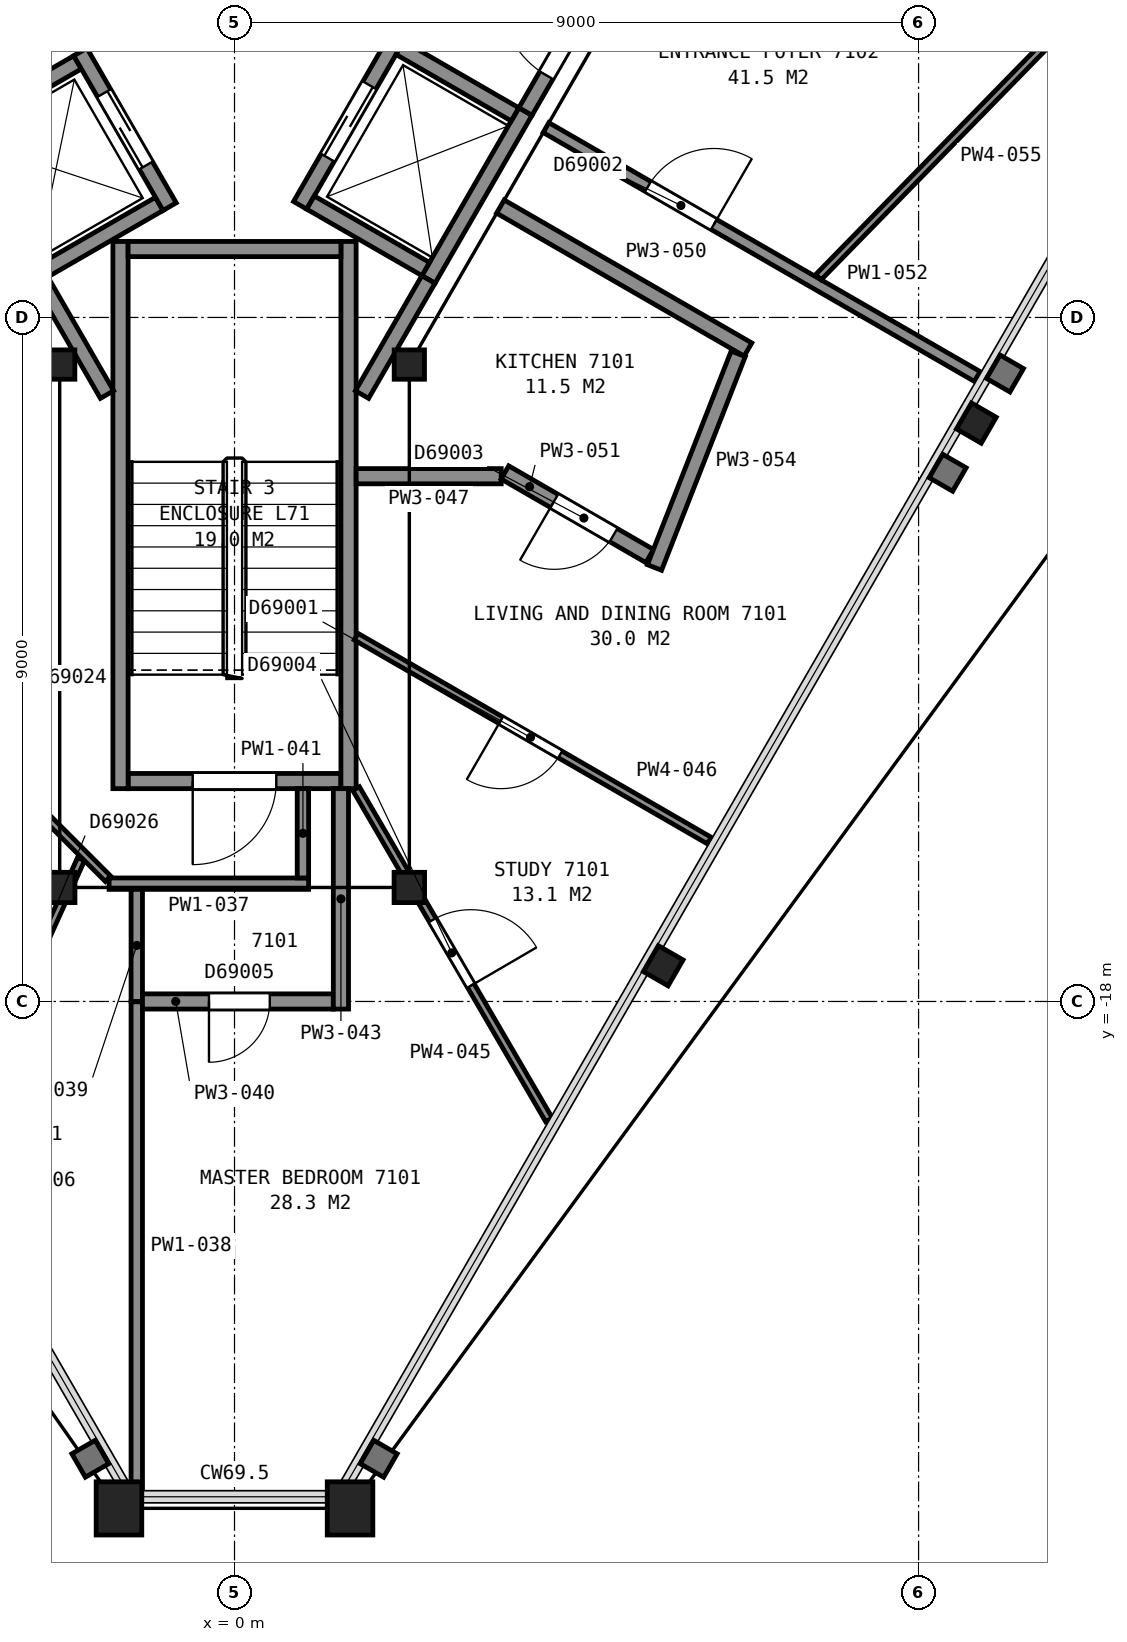
"""IFC4 building model, lengths in metres.
Left out: names, types, materials, properties, quantities, classifications, styles, units other than length and angle.
Written with IfcOpenShell. Run it as: python <this file> out.ifc"""

import sys

from ifc_helpers import new_model, si_unit, direction, frame, frame_2d, origin, origin_2d, place, context, subcontext, project, spatial, rectangle, hollow_rectangle, i_section, extrude, element, fill, save


model = new_model("IFC4")
c1 = context("Model", 3, precision=1e-05, world=origin(), true_north=direction((0.0, 1.0)))
c2 = subcontext(c1, "Body", "Model", "MODEL_VIEW")
j1 = project(units=[si_unit("LENGTHUNIT", "METRE"), si_unit("PLANEANGLEUNIT", "RADIAN")], contexts=[c1])
p1 = place(None, origin())
s1 = spatial("IfcSite", under=j1, at=p1, CompositionType="ELEMENT")
p2 = place(p1, origin())
s2 = spatial("IfcBuilding", under=s1, at=p2, CompositionType="ELEMENT")
p3 = place(p2, frame((0.0, 0.0, 282.5)))
s3 = spatial("IfcBuildingStorey", under=s2, at=p3, CompositionType="ELEMENT", Elevation=282.5)
for number, where, z_axis, x_axis in (
    (1, (-1.52, -24.67, 0.0), (0.0, 0.0, 1.0), (-1.0, 0.0, 0.0)),
    (2, (1.52, -24.67, 0.0), (0.0, 0.0, 1.0), (-1.0, 0.0, 0.0)),
):
    element("IfcColumn", number, at=place(p3, frame(where, z_axis=z_axis, x_axis=x_axis)), inside=s3, PredefinedType="COLUMN", context=c2, shape_type="SweptSolid", body=[
        extrude(hollow_rectangle(XDim=0.6, YDim=0.7, WallThickness=0.04, at=origin_2d()), origin(), (0.0, 0.0, 1.0), 3.7),
    ])
for number, where, z_axis, x_axis in (
    (3, (5.64, -17.53, 0.0), (0.0, 0.0, 1.0), (-0.5, -0.866, 0.0)),
    (4, (9.76, -10.39, 0.0), (0.0, 0.0, 1.0), (-0.5, -0.866, 0.0)),
):
    element("IfcColumn", number, at=place(p3, frame(where, z_axis=z_axis, x_axis=x_axis)), inside=s3, PredefinedType="COLUMN", context=c2, shape_type="SweptSolid", body=[
        extrude(i_section(OverallWidth=0.394, OverallDepth=0.376, WebThickness=0.017, FlangeThickness=0.028, FilletRadius=0.015, at=origin_2d()), origin(), (0.0, 0.0, 1.0), 3.7),
    ])
p4 = place(p3, frame((-2.3, -9.62, 0.0), z_axis=(0.0, 0.0, 1.0), x_axis=(1.0, 0.0, 0.0)))
e5 = element("IfcColumn", 5, at=p4, inside=s3, PredefinedType="COLUMN", context=c2, shape_type="SweptSolid", body=[
    extrude(i_section(OverallWidth=0.399, OverallDepth=0.386, WebThickness=0.021, FlangeThickness=0.033, FilletRadius=0.015, at=origin_2d()), origin(), (0.0, 0.0, 1.0), 3.7),
])
for number, where, z_axis, x_axis in (
    (6, (-2.3, -16.5, 0.0), (0.0, 0.0, 1.0), (-1.0, 0.0, 0.0)),
    (7, (2.3, -16.5, 0.0), (0.0, 0.0, 1.0), (-1.0, 0.0, 0.0)),
):
    element("IfcColumn", number, at=place(p3, frame(where, z_axis=z_axis, x_axis=x_axis)), inside=s3, PredefinedType="COLUMN", context=c2, shape_type="SweptSolid", body=[
        extrude(i_section(OverallWidth=0.401, OverallDepth=0.399, WebThickness=0.025, FlangeThickness=0.04, FilletRadius=0.015, at=origin_2d()), origin(), (0.0, 0.0, 1.0), 3.7),
    ])
p5 = place(p3, frame((2.3, -9.62, 0.0), z_axis=(0.0, 0.0, 1.0), x_axis=(1.0, 0.0, 0.0)))
e8 = element("IfcColumn", 8, at=p5, inside=s3, PredefinedType="COLUMN", context=c2, shape_type="SweptSolid", body=[
    extrude(i_section(OverallWidth=0.399, OverallDepth=0.386, WebThickness=0.021, FlangeThickness=0.033, FilletRadius=0.015, at=origin_2d()), origin(), (0.0, 0.0, 1.0), 3.7),
])
p6 = place(p3, frame((-1.4, -15.1, 0.0), z_axis=(0.0, 0.0, 1.0), x_axis=(1.0, 0.0, 0.0)))
e9 = element("IfcWall", 9, at=p6, inside=s3, PredefinedType="PARTITIONING", context=c2, shape_type="SweptSolid", body=[
    extrude(rectangle(XDim=2.8, YDim=0.2, at=frame_2d((1.4, 0.0))), origin(), (0.0, 0.0, 1.0), 3.45),
])
p7 = place(p6, frame((0.85, 0.0, 0.0)))
e10 = element("IfcOpeningElement", 10, at=p7, cuts=e9, PredefinedType="OPENING", context=c2, shape_type="SweptSolid", body=[
    extrude(rectangle(XDim=1.1, YDim=2.1, at=frame_2d((0.55, 1.05))), frame((0.0, 0.11, 0.0), z_axis=(0.0, -1.0, 0.0), x_axis=(1.0, 0.0, 0.0)), (0.0, 0.0, 1.0), 0.22),
])
for number, where, z_axis, x_axis in (
    (11, (1.5, -8.0, 0.0), (0.0, 0.0, 1.0), (0.0, -1.0, 0.0)),
    (12, (-1.5, -8.0, 0.0), (0.0, 0.0, 1.0), (0.0, -1.0, 0.0)),
):
    element("IfcWall", number, at=place(p3, frame(where, z_axis=z_axis, x_axis=x_axis)), inside=s3, PredefinedType="PARTITIONING", context=c2, shape_type="SweptSolid", body=[
        extrude(rectangle(XDim=7.2, YDim=0.2, at=frame_2d((3.6, 0.0))), origin(), (0.0, 0.0, 1.0), 3.45),
    ])
p8 = place(p3, frame((-1.4, -8.1, 0.0), z_axis=(0.0, 0.0, 1.0), x_axis=(1.0, 0.0, 0.0)))
e13 = element("IfcWall", 13, at=p8, inside=s3, PredefinedType="PARTITIONING", context=c2, shape_type="SweptSolid", body=[
    extrude(rectangle(XDim=2.8, YDim=0.2, at=frame_2d((1.4, 0.0))), origin(), (0.0, 0.0, 1.0), 3.45),
])
for number, where, z_axis, x_axis in (
    (14, (-2.505, -8.38, 0.0), (0.0, 0.0, 1.0), (0.866, 0.5, 0.0)),
    (15, (-3.58, -6.519, 0.0), (0.0, 0.0, 1.0), (0.866, 0.5, 0.0)),
):
    element("IfcWall", number, at=place(p3, frame(where, z_axis=z_axis, x_axis=x_axis)), inside=s3, PredefinedType="PARTITIONING", context=c2, shape_type="SweptSolid", body=[
        extrude(rectangle(XDim=1.75, YDim=0.2, at=frame_2d((0.875, 0.0))), origin(), (0.0, 0.0, 1.0), 3.7),
    ])
p9 = place(p3, frame((2.552, -8.5, 0.0), z_axis=(0.0, 0.0, 1.0), x_axis=(0.499990435942, 0.866030925526, 0.0)))
e16 = element("IfcWall", 16, at=p9, inside=s3, PredefinedType="PARTITIONING", context=c2, shape_type="SweptSolid", body=[
    extrude(rectangle(XDim=2.55, YDim=0.2, at=frame_2d((1.275, 0.0))), origin(), (0.0, 0.0, 1.0), 3.7),
])
p10 = place(p3, frame((0.863, -7.525, 0.0), z_axis=(0.0, 0.0, 1.0), x_axis=(0.499990435942, 0.866030925526, 0.0)))
e17 = element("IfcWall", 17, at=p10, inside=s3, PredefinedType="PARTITIONING", context=c2, shape_type="SweptSolid", body=[
    extrude(rectangle(XDim=2.55, YDim=0.2, at=frame_2d((1.275, 0.0))), origin(), (0.0, 0.0, 1.0), 3.7),
])
p11 = place(p10, frame((0.725, 0.0, 0.0)))
e18 = element("IfcOpeningElement", 18, at=p11, cuts=e17, PredefinedType="OPENING", context=c2, shape_type="SweptSolid", body=[
    extrude(rectangle(XDim=1.1, YDim=2.1, at=frame_2d((0.55, 1.05))), frame((0.0, 0.11, 0.0), z_axis=(0.0, -1.0, 0.0), x_axis=(1.0, 0.0, 0.0)), (0.0, 0.0, 1.0), 0.22),
])
p12 = place(p3, frame((-0.853, -7.542, 0.0), z_axis=(0.0, 0.0, 1.0), x_axis=(-0.500016218704, 0.866016039709, 0.0)))
e19 = element("IfcWall", 19, at=p12, inside=s3, PredefinedType="PARTITIONING", context=c2, shape_type="SweptSolid", body=[
    extrude(rectangle(XDim=2.35, YDim=0.2, at=frame_2d((1.175, 0.0))), origin(), (0.0, 0.0, 1.0), 3.7),
])
p13 = place(p12, frame((0.625, 0.0, 0.0)))
e20 = element("IfcOpeningElement", 20, at=p13, cuts=e19, PredefinedType="OPENING", context=c2, shape_type="SweptSolid", body=[
    extrude(rectangle(XDim=1.1, YDim=2.1, at=frame_2d((0.55, 1.05))), frame((0.0, 0.11, 0.0), z_axis=(0.0, -1.0, 0.0), x_axis=(1.0, 0.0, 0.0)), (0.0, 0.0, 1.0), 0.22),
])
for number, where, z_axis, x_axis in (
    (21, (3.69, -6.328, 0.0), (0.0, 0.0, 1.0), (-0.866, 0.5, 0.0)),
    (22, (2.515, -8.363, 0.0), (0.0, 0.0, 1.0), (-0.866, 0.5, 0.0)),
):
    element("IfcWall", number, at=place(p3, frame(where, z_axis=z_axis, x_axis=x_axis)), inside=s3, PredefinedType="PARTITIONING", context=c2, shape_type="SweptSolid", body=[
        extrude(rectangle(XDim=1.75, YDim=0.2, at=frame_2d((0.875, 0.0))), origin(), (0.0, 0.0, 1.0), 3.7),
    ])
p14 = place(p3, frame((-2.541, -8.519, 0.0), z_axis=(0.0, 0.0, 1.0), x_axis=(0.500016142392, -0.86601608377, 0.0)))
e23 = element("IfcWall", 23, at=p14, inside=s3, PredefinedType="PARTITIONING", context=c2, shape_type="SweptSolid", body=[
    extrude(rectangle(XDim=1.727, YDim=0.2, at=frame_2d((0.864, 0.0))), origin(), (0.0, 0.0, 1.0), 3.45),
])
p15 = place(p3, frame((1.677, -10.015, 0.0), z_axis=(0.0, 0.0, 1.0), x_axis=(0.49983532306, 0.866120459187, 0.0)))
e24 = element("IfcWall", 24, at=p15, inside=s3, PredefinedType="PARTITIONING", context=c2, shape_type="SweptSolid", body=[
    extrude(rectangle(XDim=1.748, YDim=0.2, at=frame_2d((0.874, 0.0))), origin(), (0.0, 0.0, 1.0), 3.45),
])
p16 = place(p3, frame((3.828, -6.29, 0.0), z_axis=(0.0, 0.0, 1.0), x_axis=(0.499979739078, 0.866037101117, 0.0)))
e25 = element("IfcWall", 25, at=p16, inside=s3, PredefinedType="PARTITIONING", context=c2, shape_type="SweptSolid", body=[
    extrude(rectangle(XDim=11.363, YDim=0.2, at=frame_2d((5.681, 0.0))), origin(), (0.0, 0.0, 1.0), 3.45),
])
p17 = place(p16, frame((0.55, 0.0, 0.0)))
e26 = element("IfcOpeningElement", 26, at=p17, cuts=e25, PredefinedType="OPENING", context=c2, shape_type="SweptSolid", body=[
    extrude(rectangle(XDim=1.2, YDim=2.1, at=frame_2d((0.6, 1.05))), frame((0.0, 0.11, 0.0), z_axis=(0.0, -1.0, 0.0), x_axis=(1.0, 0.0, 0.0)), (0.0, 0.0, 1.0), 0.22),
])
p18 = place(p3, frame((-2.019, -16.127, 0.0), z_axis=(0.0, 0.0, 1.0), x_axis=(-0.411876718461, -0.911239578151, 0.0)))
e27 = element("IfcWall", 27, at=p18, inside=s3, PredefinedType="PARTITIONING", context=c2, shape_type="SweptSolid", body=[
    extrude(rectangle(XDim=4.376, YDim=0.1, at=frame_2d((2.188, 0.0))), origin(), (0.0, 0.0, 1.0), 2.723),
])
p19 = place(p18, frame((1.591, 0.0, 0.0)))
e28 = element("IfcOpeningElement", 28, at=p19, cuts=e27, PredefinedType="OPENING", context=c2, shape_type="SweptSolid", body=[
    extrude(rectangle(XDim=1.0, YDim=2.1, at=frame_2d((0.5, 1.05))), frame((0.0, 0.06, 0.0), z_axis=(0.0, -1.0, 0.0), x_axis=(1.0, 0.0, 0.0)), (0.0, 0.0, 1.0), 0.12),
])
p20 = place(p3, frame((-2.801, -15.25, 0.0), z_axis=(0.0, 0.0, 1.0), x_axis=(0.707106781187, -0.707106781187, 0.0)))
e29 = element("IfcWall", 29, at=p20, inside=s3, PredefinedType="PARTITIONING", context=c2, shape_type="SweptSolid", body=[
    extrude(rectangle(XDim=1.608, YDim=0.1, at=frame_2d((0.804, 0.0))), origin(), (0.0, 0.0, 1.0), 2.723),
])
p21 = place(p3, frame((-1.65, -16.45, 0.0), z_axis=(0.0, 0.0, 1.0), x_axis=(1.0, 0.0, 0.0)))
e30 = element("IfcWall", 30, at=p21, inside=s3, PredefinedType="PARTITIONING", context=c2, shape_type="SweptSolid", body=[
    extrude(rectangle(XDim=2.625, YDim=0.15, at=frame_2d((1.312, 0.0))), origin(), (0.0, 0.0, 1.0), 2.723),
])
p22 = place(p3, frame((-1.286, -24.421, 0.0), z_axis=(0.0, 0.0, 1.0), x_axis=(0.0, 1.0, 0.0)))
e31 = element("IfcWall", 31, at=p22, inside=s3, PredefinedType="PARTITIONING", context=c2, shape_type="SweptSolid", body=[
    extrude(rectangle(XDim=6.416, YDim=0.15, at=frame_2d((3.208, 0.0))), origin(), (0.0, 0.0, 1.0), 2.723),
])
p23 = place(p3, frame((-1.286, -18.0, 0.0), z_axis=(0.0, 0.0, 1.0), x_axis=(0.0, 1.0, 0.0)))
e32 = element("IfcWall", 32, at=p23, inside=s3, PredefinedType="PARTITIONING", context=c2, shape_type="SweptSolid", body=[
    extrude(rectangle(XDim=1.475, YDim=0.15, at=frame_2d((0.738, 0.0))), origin(), (0.0, 0.0, 1.0), 2.723),
])
p24 = place(p3, frame((-1.211, -18.0, 0.0), z_axis=(0.0, 0.0, 1.0), x_axis=(1.0, 0.0, 0.0)))
e33 = element("IfcWall", 33, at=p24, inside=s3, PredefinedType="PARTITIONING", context=c2, shape_type="SweptSolid", body=[
    extrude(rectangle(XDim=2.511, YDim=0.2, at=frame_2d((1.255, 0.0))), origin(), (0.0, 0.0, 1.0), 2.723),
])
p25 = place(p24, frame((0.875, 0.0, 0.0)))
e34 = element("IfcOpeningElement", 34, at=p25, cuts=e33, PredefinedType="OPENING", context=c2, shape_type="SweptSolid", body=[
    extrude(rectangle(XDim=0.8, YDim=2.1, at=frame_2d((0.4, 1.05))), frame((0.0, 0.11, 0.0), z_axis=(0.0, -1.0, 0.0), x_axis=(1.0, 0.0, 0.0)), (0.0, 0.0, 1.0), 0.22),
])
p26 = place(p3, frame((0.9, -16.375, 0.0), z_axis=(0.0, 0.0, 1.0), x_axis=(0.0, 1.0, 0.0)))
e35 = element("IfcWall", 35, at=p26, inside=s3, PredefinedType="PARTITIONING", context=c2, shape_type="SweptSolid", body=[
    extrude(rectangle(XDim=1.175, YDim=0.15, at=frame_2d((0.587, 0.0))), origin(), (0.0, 0.0, 1.0), 2.723),
])
p27 = place(p3, frame((1.4, -18.1, 0.0), z_axis=(0.0, 0.0, 1.0), x_axis=(0.0, 1.0, 0.0)))
e36 = element("IfcWall", 36, at=p27, inside=s3, PredefinedType="PARTITIONING", context=c2, shape_type="SweptSolid", body=[
    extrude(rectangle(XDim=2.9, YDim=0.2, at=frame_2d((1.45, 0.0))), origin(), (0.0, 0.0, 1.0), 2.723),
])
p28 = place(p3, frame((4.137, -19.557, 0.0), z_axis=(0.0, 0.0, 1.0), x_axis=(-0.503229634544, 0.864152726615, 0.0)))
e37 = element("IfcWall", 37, at=p28, inside=s3, PredefinedType="PARTITIONING", context=c2, shape_type="SweptSolid", body=[
    extrude(rectangle(XDim=5.042, YDim=0.1, at=frame_2d((2.521, 0.0))), origin(), (0.0, 0.0, 1.0), 2.723),
])
p29 = place(p28, frame((2.042, 0.0, 0.0)))
e38 = element("IfcOpeningElement", 38, at=p29, cuts=e37, PredefinedType="OPENING", context=c2, shape_type="SweptSolid", body=[
    extrude(rectangle(XDim=1.0, YDim=2.1, at=frame_2d((0.5, 1.05))), frame((0.0, 0.06, 0.0), z_axis=(0.0, -1.0, 0.0), x_axis=(1.0, 0.0, 0.0)), (0.0, 0.0, 1.0), 0.12),
])
p30 = place(p3, frame((6.247, -15.883, 0.0), z_axis=(0.0, 0.0, 1.0), x_axis=(-0.866008267802, 0.500029679218, 0.0)))
e39 = element("IfcWall", 39, at=p30, inside=s3, PredefinedType="PARTITIONING", context=c2, shape_type="SweptSolid", body=[
    extrude(rectangle(XDim=5.365, YDim=0.1, at=frame_2d((2.683, 0.0))), origin(), (0.0, 0.0, 1.0), 2.723),
])
p31 = place(p30, frame((2.265, 0.0, 0.0)))
e40 = element("IfcOpeningElement", 40, at=p31, cuts=e39, PredefinedType="OPENING", context=c2, shape_type="SweptSolid", body=[
    extrude(rectangle(XDim=0.9, YDim=2.1, at=frame_2d((0.45, 1.05))), frame((0.0, 0.06, 0.0), z_axis=(0.0, -1.0, 0.0), x_axis=(1.0, 0.0, 0.0)), (0.0, 0.0, 1.0), 0.12),
])
p32 = place(p3, frame((1.6, -11.089, 0.0), z_axis=(0.0, 0.0, 1.0), x_axis=(1.0, 0.0, 0.0)))
e41 = element("IfcWall", 41, at=p32, inside=s3, PredefinedType="PARTITIONING", context=c2, shape_type="SweptSolid", body=[
    extrude(rectangle(XDim=1.909, YDim=0.2, at=frame_2d((0.955, 0.0))), origin(), (0.0, 0.0, 1.0), 2.723),
])
p33 = place(p3, frame((3.498, -7.541, 0.0), z_axis=(0.0, 0.0, 1.0), x_axis=(0.865985624761, -0.500068892961, 0.0)))
e42 = element("IfcWall", 42, at=p33, inside=s3, PredefinedType="PARTITIONING", context=c2, shape_type="SweptSolid", body=[
    extrude(rectangle(XDim=3.762, YDim=0.2, at=frame_2d((1.881, 0.0))), origin(), (0.0, 0.0, 1.0), 2.723),
])
p34 = place(p3, frame((3.557, -11.039, 0.0), z_axis=(0.0, 0.0, 1.0), x_axis=(0.865932364885, -0.500161113487, 0.0)))
e43 = element("IfcWall", 43, at=p34, inside=s3, PredefinedType="PARTITIONING", context=c2, shape_type="SweptSolid", body=[
    extrude(rectangle(XDim=2.2, YDim=0.2, at=frame_2d((1.1, 0.0))), origin(), (0.0, 0.0, 1.0), 2.723),
])
p35 = place(p34, frame((0.75, 0.0, 0.0)))
e44 = element("IfcOpeningElement", 44, at=p35, cuts=e43, PredefinedType="OPENING", context=c2, shape_type="SweptSolid", body=[
    extrude(rectangle(XDim=0.9, YDim=2.1, at=frame_2d((0.45, 1.05))), frame((0.0, 0.11, 0.0), z_axis=(0.0, -1.0, 0.0), x_axis=(1.0, 0.0, 0.0)), (0.0, 0.0, 1.0), 0.22),
])
p36 = place(p3, frame((9.772, -9.777, 0.0), z_axis=(0.0, 0.0, 1.0), x_axis=(-0.866083818164, 0.499898809675, 0.0)))
e45 = element("IfcWall", 45, at=p36, inside=s3, PredefinedType="PARTITIONING", context=c2, shape_type="SweptSolid", body=[
    extrude(rectangle(XDim=6.551, YDim=0.15, at=frame_2d((3.275, 0.0))), origin(), (0.0, 0.0, 1.0), 2.723),
])
p37 = place(p36, frame((4.001, 0.0, 0.0)))
e46 = element("IfcOpeningElement", 46, at=p37, cuts=e45, PredefinedType="OPENING", context=c2, shape_type="SweptSolid", body=[
    extrude(rectangle(XDim=1.0, YDim=2.1, at=frame_2d((0.5, 1.05))), frame((0.0, 0.085, 0.0), z_axis=(0.0, -1.0, 0.0), x_axis=(1.0, 0.0, 0.0)), (0.0, 0.0, 1.0), 0.17),
])
p38 = place(p3, frame((5.526, -12.29, 0.0), z_axis=(0.0, 0.0, 1.0), x_axis=(0.364786545928, 0.931091174864, 0.0)))
e47 = element("IfcWall", 47, at=p38, inside=s3, PredefinedType="PARTITIONING", context=c2, shape_type="SweptSolid", body=[
    extrude(rectangle(XDim=3.019, YDim=0.2, at=frame_2d((1.51, 0.0))), origin(), (0.0, 0.0, 1.0), 2.723),
])
p39 = place(p3, frame((7.682, -8.47, 0.0), z_axis=(0.0, 0.0, 1.0), x_axis=(0.698777378461, 0.715339203002, 0.0)))
e48 = element("IfcWall", 48, at=p39, inside=s3, PredefinedType="PARTITIONING", context=c2, shape_type="SweptSolid", body=[
    extrude(rectangle(XDim=4.452, YDim=0.1, at=frame_2d((2.226, 0.0))), origin(), (0.0, 0.0, 1.0), 2.723),
])
p40 = place(p7, origin())
e49 = element("IfcDoor", 49, at=p40, inside=s3, OperationType="SINGLE_SWING_LEFT", PredefinedType="DOOR", context=c2, shape_type="SweptSolid", body=[
    extrude(rectangle(XDim=1.1, YDim=2.1, at=frame_2d((0.55, 1.05))), frame((0.0, 0.025, 0.0), z_axis=(0.0, -1.0, 0.0), x_axis=(1.0, 0.0, 0.0)), (0.0, 0.0, 1.0), 0.05),
])
fill(e10, e49)
p41 = place(p13, origin())
e50 = element("IfcDoor", 50, at=p41, inside=s3, OperationType="SLIDING_TO_LEFT", PredefinedType="DOOR", context=c2, shape_type="SweptSolid", body=[
    extrude(rectangle(XDim=1.1, YDim=2.1, at=frame_2d((0.55, 1.05))), frame((0.0, 0.025, 0.0), z_axis=(0.0, -1.0, 0.0), x_axis=(1.0, 0.0, 0.0)), (0.0, 0.0, 1.0), 0.05),
])
fill(e20, e50)
p42 = place(p11, origin())
e51 = element("IfcDoor", 51, at=p42, inside=s3, OperationType="SLIDING_TO_LEFT", PredefinedType="DOOR", context=c2, shape_type="SweptSolid", body=[
    extrude(rectangle(XDim=1.1, YDim=2.1, at=frame_2d((0.55, 1.05))), frame((0.0, 0.025, 0.0), z_axis=(0.0, -1.0, 0.0), x_axis=(1.0, 0.0, 0.0)), (0.0, 0.0, 1.0), 0.05),
])
fill(e18, e51)
p43 = place(p17, origin())
e52 = element("IfcDoor", 52, at=p43, inside=s3, OperationType="SINGLE_SWING_RIGHT", PredefinedType="DOOR", context=c2, shape_type="SweptSolid", body=[
    extrude(rectangle(XDim=1.2, YDim=2.1, at=frame_2d((0.6, 1.05))), frame((0.0, 0.025, 0.0), z_axis=(0.0, -1.0, 0.0), x_axis=(1.0, 0.0, 0.0)), (0.0, 0.0, 1.0), 0.05),
])
fill(e26, e52)
p44 = place(p25, origin())
e53 = element("IfcDoor", 53, at=p44, inside=s3, OperationType="SINGLE_SWING_LEFT", PredefinedType="DOOR", context=c2, shape_type="SweptSolid", body=[
    extrude(rectangle(XDim=0.8, YDim=2.1, at=frame_2d((0.4, 1.05))), frame((0.0, 0.025, 0.0), z_axis=(0.0, -1.0, 0.0), x_axis=(1.0, 0.0, 0.0)), (0.0, 0.0, 1.0), 0.05),
])
fill(e34, e53)
p45 = place(p29, origin())
e54 = element("IfcDoor", 54, at=p45, inside=s3, OperationType="SINGLE_SWING_LEFT", PredefinedType="DOOR", context=c2, shape_type="SweptSolid", body=[
    extrude(rectangle(XDim=1.0, YDim=2.1, at=frame_2d((0.5, 1.05))), frame((0.0, 0.025, 0.0), z_axis=(0.0, -1.0, 0.0), x_axis=(1.0, 0.0, 0.0)), (0.0, 0.0, 1.0), 0.05),
])
fill(e38, e54)
p46 = place(p31, origin())
e55 = element("IfcDoor", 55, at=p46, inside=s3, OperationType="SINGLE_SWING_RIGHT", PredefinedType="DOOR", context=c2, shape_type="SweptSolid", body=[
    extrude(rectangle(XDim=0.9, YDim=2.1, at=frame_2d((0.45, 1.05))), frame((0.0, 0.025, 0.0), z_axis=(0.0, -1.0, 0.0), x_axis=(1.0, 0.0, 0.0)), (0.0, 0.0, 1.0), 0.05),
])
fill(e40, e55)
p47 = place(p35, origin())
e56 = element("IfcDoor", 56, at=p47, inside=s3, OperationType="SINGLE_SWING_LEFT", PredefinedType="DOOR", context=c2, shape_type="SweptSolid", body=[
    extrude(rectangle(XDim=0.9, YDim=2.1, at=frame_2d((0.45, 1.05))), frame((0.0, 0.025, 0.0), z_axis=(0.0, -1.0, 0.0), x_axis=(1.0, 0.0, 0.0)), (0.0, 0.0, 1.0), 0.05),
])
fill(e44, e56)
p48 = place(p37, origin())
e57 = element("IfcDoor", 57, at=p48, inside=s3, OperationType="SINGLE_SWING_LEFT", PredefinedType="DOOR", context=c2, shape_type="SweptSolid", body=[
    extrude(rectangle(XDim=1.0, YDim=2.1, at=frame_2d((0.5, 1.05))), frame((0.0, 0.025, 0.0), z_axis=(0.0, -1.0, 0.0), x_axis=(1.0, 0.0, 0.0)), (0.0, 0.0, 1.0), 0.05),
])
fill(e46, e57)
save(model, sys.argv[1])
